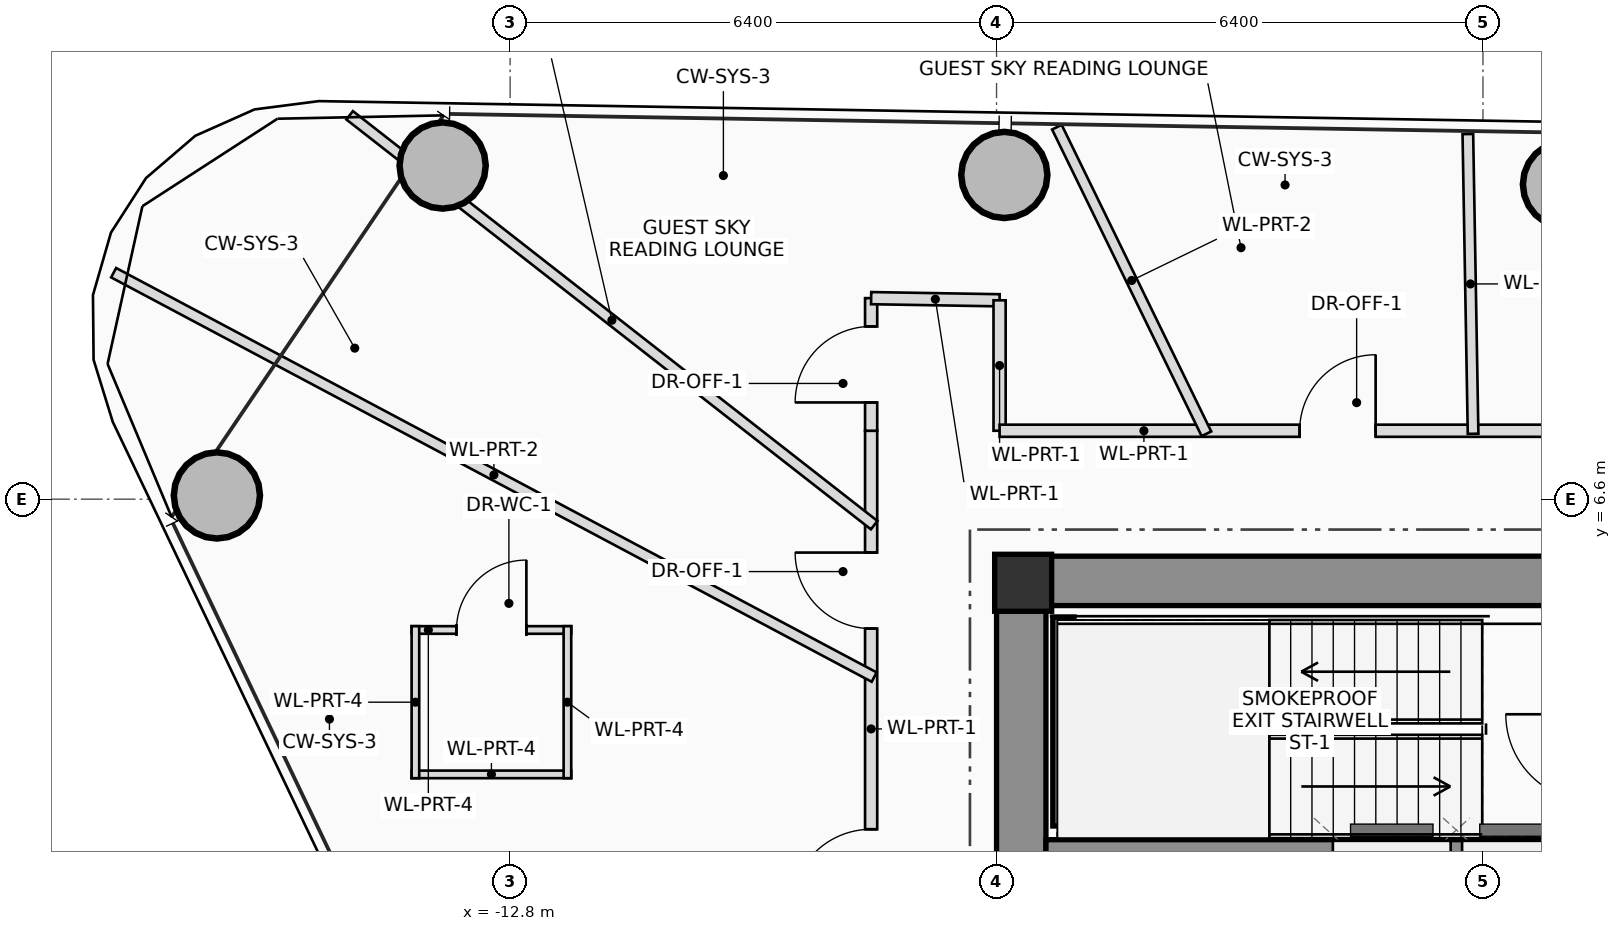
"""IFC4 building model, lengths in metres.
Left out: names, types, materials, properties, quantities, classifications, styles, units other than length and angle.
Written with IfcOpenShell. Run it as: python <this file> out.ifc"""

import sys

from ifc_helpers import new_model, si_unit, direction, frame, frame_2d, origin, origin_2d, place, context, subcontext, project, spatial, rectangle, hollow_circle, extrude, source, transform, mapped, element, fill, save


model = new_model("IFC4")
c1 = context("Model", 3, precision=1e-05, world=origin(), true_north=direction((0.0, 1.0)))
c2 = subcontext(c1, "Body", "Model", "MODEL_VIEW")
j1 = project(units=[si_unit("LENGTHUNIT", "METRE"), si_unit("PLANEANGLEUNIT", "RADIAN")], contexts=[c1])
p1 = place(None, origin())
s1 = spatial("IfcSite", under=j1, at=p1, CompositionType="ELEMENT")
p2 = place(p1, origin())
s2 = spatial("IfcBuilding", under=s1, at=p2, CompositionType="ELEMENT")
p3 = place(p2, frame((0.0, 0.0, 191.45)))
s3 = spatial("IfcBuildingStorey", under=s2, at=p3, CompositionType="ELEMENT", Elevation=191.45)
m1 = source(origin(), c2, "Body", "SweptSolid", [
    extrude(rectangle(XDim=0.75, YDim=0.75, at=origin_2d()), origin(), (0.0, 0.0, 1.0), 3.45),
])
p4 = place(p3, frame((-6.05, 5.5, 0.0), z_axis=(0.0, 0.0, 1.0), x_axis=(1.0, 0.0, 0.0)))
e1 = element("IfcColumn", 1, at=p4, inside=s3, PredefinedType="COLUMN", context=c2, shape_type="MappedRepresentation", body=[
    mapped(m1, transform((0.0, 0.0, 0.0), scale=1.0)),
])
p5 = place(p3, frame((-6.4, 5.525, 0.0), z_axis=(0.0, 0.0, 1.0), x_axis=(1.0, 0.0, 0.0)))
e2 = element("IfcWall", 2, at=p5, inside=s3, PredefinedType="SHEAR", context=c2, shape_type="SweptSolid", body=[
    extrude(rectangle(XDim=12.8, YDim=0.65, at=frame_2d((6.4, 0.0))), origin(), (0.0, 0.0, 1.0), 3.45),
])
p6 = place(p5, frame((8.6, 0.0, 0.0)))
e3 = element("IfcOpeningElement", 3, at=p6, cuts=e2, PredefinedType="OPENING", context=c2, shape_type="SweptSolid", body=[
    extrude(rectangle(XDim=1.2, YDim=2.2, at=frame_2d((0.6, 1.1))), frame((0.0, 0.335, 0.0), z_axis=(0.0, -1.0, 0.0), x_axis=(1.0, 0.0, 0.0)), (0.0, 0.0, 1.0), 0.67),
])
p7 = place(p3, frame((-6.075, 1.75, 0.0), z_axis=(0.0, 0.0, 1.0), x_axis=(0.0, 1.0, 0.0)))
e4 = element("IfcWall", 4, at=p7, inside=s3, PredefinedType="SHEAR", context=c2, shape_type="SweptSolid", body=[
    extrude(rectangle(XDim=3.45, YDim=0.65, at=frame_2d((1.725, 0.0))), origin(), (0.0, 0.0, 1.0), 3.45),
])
p8 = place(p3, frame((-5.75, 1.94, 0.0), z_axis=(0.0, 0.0, 1.0), x_axis=(1.0, 0.0, 0.0)))
e5 = element("IfcWall", 5, at=p8, inside=s3, PredefinedType="SHEAR", context=c2, shape_type="SweptSolid", body=[
    extrude(rectangle(XDim=11.5, YDim=0.36, at=frame_2d((5.75, 0.0))), origin(), (0.0, 0.0, 1.0), 3.45),
])
p9 = place(p3, frame((-5.52, 2.3, 0.0), z_axis=(0.0, 0.0, 1.0), x_axis=(0.0, 1.0, 0.0)))
e6 = element("IfcWall", 6, at=p9, inside=s3, PredefinedType="SHEAR", context=c2, shape_type="SweptSolid", body=[
    extrude(rectangle(XDim=2.75, YDim=0.28, at=frame_2d((1.375, 0.0))), origin(), (0.0, 0.0, 1.0), 3.45),
])
m2 = source(origin(), c2, "Body", "SweptSolid", [
    extrude(hollow_circle(Radius=0.575, WallThickness=0.042, at=origin_2d()), origin(), (0.0, 0.0, 1.0), 3.45),
])
for number, where, z_axis, x_axis in (
    (7, (1.092, 10.742, 0.0), (0.0, 0.0, 1.0), (1.0, 0.0, 0.0)),
    (8, (-6.298, 10.865, 0.0), (0.0, 0.0, 1.0), (1.0, 0.0, 0.0)),
    (9, (-13.688, 10.99, 0.0), (0.0, 0.0, 1.0), (1.0, 0.0, 0.0)),
    (10, (-16.658, 6.649, 0.0), (0.0, 0.0, 1.0), (1.0, 0.0, 0.0)),
):
    element("IfcColumn", number, at=place(p3, frame(where, z_axis=z_axis, x_axis=x_axis)), inside=s3, PredefinedType="COLUMN", context=c2, shape_type="MappedRepresentation", body=[
        mapped(m2, transform((0.0, 0.0, 0.0), scale=1.0)),
    ])
p10 = place(p3, frame((-14.096, 4.879, 0.0), z_axis=(0.0, 0.0, 1.0), x_axis=(1.0, 0.0, 0.0)))
e11 = element("IfcWall", 11, at=p10, inside=s3, PredefinedType="PARTITIONING", context=c2, shape_type="SweptSolid", body=[
    extrude(rectangle(XDim=2.1, YDim=0.1, at=frame_2d((1.05, 0.0))), origin(), (0.0, 0.0, 1.0), 2.905),
])
p11 = place(p10, frame((0.59, 0.0, 0.0)))
e12 = element("IfcOpeningElement", 12, at=p11, cuts=e11, PredefinedType="OPENING", context=c2, shape_type="SweptSolid", body=[
    extrude(rectangle(XDim=0.92, YDim=2.1, at=frame_2d((0.46, 1.05))), frame((0.0, 0.06, 0.0), z_axis=(0.0, -1.0, 0.0), x_axis=(1.0, 0.0, 0.0)), (0.0, 0.0, 1.0), 0.12),
])
p12 = place(p3, frame((-11.996, 2.979, 0.0), z_axis=(0.0, 0.0, 1.0), x_axis=(-1.0, 0.0, 0.0)))
e13 = element("IfcWall", 13, at=p12, inside=s3, PredefinedType="PARTITIONING", context=c2, shape_type="SweptSolid", body=[
    extrude(rectangle(XDim=2.1, YDim=0.1, at=frame_2d((1.05, 0.0))), origin(), (0.0, 0.0, 1.0), 2.905),
])
for number, where, z_axis, x_axis in (
    (14, (-12.046, 4.929, 0.0), (0.0, 0.0, 1.0), (0.0, -1.0, 0.0)),
    (15, (-14.046, 2.929, 0.0), (0.0, 0.0, 1.0), (0.0, 1.0, 0.0)),
):
    element("IfcWall", number, at=place(p3, frame(where, z_axis=z_axis, x_axis=x_axis)), inside=s3, PredefinedType="PARTITIONING", context=c2, shape_type="SweptSolid", body=[
        extrude(rectangle(XDim=2.0, YDim=0.1, at=frame_2d((1.0, 0.0))), origin(), (0.0, 0.0, 1.0), 3.25),
    ])
p13 = place(p3, frame((-8.05, -7.5, 0.0), z_axis=(0.0, 0.0, 1.0), x_axis=(0.0, 1.0, 0.0)))
e16 = element("IfcWall", 16, at=p13, inside=s3, PredefinedType="PARTITIONING", context=c2, shape_type="SweptSolid", body=[
    extrude(rectangle(XDim=15.0, YDim=0.16, at=frame_2d((7.5, 0.0))), origin(), (0.0, 0.0, 1.0), 2.605),
])
p14 = place(p13, frame((2.177, 0.0, 0.0)))
e17 = element("IfcOpeningElement", 17, at=p14, cuts=e16, PredefinedType="OPENING", context=c2, shape_type="SweptSolid", body=[
    extrude(rectangle(XDim=1.0, YDim=2.25, at=frame_2d((0.5, 1.125))), frame((0.0, 0.09, 0.0), z_axis=(0.0, -1.0, 0.0), x_axis=(1.0, 0.0, 0.0)), (0.0, 0.0, 1.0), 0.18),
])
p15 = place(p13, frame((5.453, 0.0, 0.0)))
e18 = element("IfcOpeningElement", 18, at=p15, cuts=e16, PredefinedType="OPENING", context=c2, shape_type="SweptSolid", body=[
    extrude(rectangle(XDim=0.9, YDim=2.05, at=frame_2d((0.45, 1.025))), frame((0.0, 0.09, 0.0), z_axis=(0.0, -1.0, 0.0), x_axis=(1.0, 0.0, 0.0)), (0.0, 0.0, 1.0), 0.18),
])
p16 = place(p13, frame((8.707, 0.0, 0.0)))
e19 = element("IfcOpeningElement", 19, at=p16, cuts=e16, PredefinedType="OPENING", context=c2, shape_type="SweptSolid", body=[
    extrude(rectangle(XDim=1.05, YDim=2.2, at=frame_2d((0.525, 1.1))), frame((0.0, 0.09, 0.0), z_axis=(0.0, -1.0, 0.0), x_axis=(1.0, 0.0, 0.0)), (0.0, 0.0, 1.0), 0.18),
])
p17 = place(p13, frame((12.397, 0.0, 0.0)))
e20 = element("IfcOpeningElement", 20, at=p17, cuts=e16, PredefinedType="OPENING", context=c2, shape_type="SweptSolid", body=[
    extrude(rectangle(XDim=1.0, YDim=2.25, at=frame_2d((0.5, 1.125))), frame((0.0, 0.09, 0.0), z_axis=(0.0, -1.0, 0.0), x_axis=(1.0, 0.0, 0.0)), (0.0, 0.0, 1.0), 0.18),
])
p18 = place(p3, frame((-8.05, 7.5, 0.0), z_axis=(0.0, 0.0, 1.0), x_axis=(0.0, 1.0, 0.0)))
e21 = element("IfcWall", 21, at=p18, inside=s3, PredefinedType="PARTITIONING", context=c2, shape_type="SweptSolid", body=[
    extrude(rectangle(XDim=1.745, YDim=0.16, at=frame_2d((0.872, 0.0))), origin(), (0.0, 0.0, 1.0), 2.805),
])
p19 = place(p18, frame((0.372, 0.0, 0.0)))
e22 = element("IfcOpeningElement", 22, at=p19, cuts=e21, PredefinedType="OPENING", context=c2, shape_type="SweptSolid", body=[
    extrude(rectangle(XDim=1.0, YDim=2.25, at=frame_2d((0.5, 1.125))), frame((0.0, 0.09, 0.0), z_axis=(0.0, -1.0, 0.0), x_axis=(1.0, 0.0, 0.0)), (0.0, 0.0, 1.0), 0.18),
])
p20 = place(p3, frame((-8.05, 9.245, 0.0), z_axis=(0.0, 0.0, 1.0), x_axis=(0.999859611566, -0.016755809729, 0.0)))
e23 = element("IfcWall", 23, at=p20, inside=s3, PredefinedType="PARTITIONING", context=c2, shape_type="SweptSolid", body=[
    extrude(rectangle(XDim=1.69, YDim=0.16, at=frame_2d((0.845, 0.0))), origin(), (0.0, 0.0, 1.0), 2.905),
])
p21 = place(p3, frame((-6.36, 9.216, 0.0), z_axis=(0.0, 0.0, 1.0), x_axis=(0.0, -1.0, 0.0)))
e24 = element("IfcWall", 24, at=p21, inside=s3, PredefinedType="PARTITIONING", context=c2, shape_type="SweptSolid", body=[
    extrude(rectangle(XDim=1.716, YDim=0.16, at=frame_2d((0.858, 0.0))), origin(), (0.0, 0.0, 1.0), 2.605),
])
p22 = place(p3, frame((-6.36, 7.5, 0.0), z_axis=(0.0, 0.0, 1.0), x_axis=(1.0, 0.0, 0.0)))
e25 = element("IfcWall", 25, at=p22, inside=s3, PredefinedType="PARTITIONING", context=c2, shape_type="SweptSolid", body=[
    extrude(rectangle(XDim=11.61, YDim=0.16, at=frame_2d((5.805, 0.0))), origin(), (0.0, 0.0, 1.0), 2.605),
])
p23 = place(p22, frame((3.948, 0.0, 0.0)))
e26 = element("IfcOpeningElement", 26, at=p23, cuts=e25, PredefinedType="OPENING", context=c2, shape_type="SweptSolid", body=[
    extrude(rectangle(XDim=1.0, YDim=2.25, at=frame_2d((0.5, 1.125))), frame((0.0, 0.09, 0.0), z_axis=(0.0, -1.0, 0.0), x_axis=(1.0, 0.0, 0.0)), (0.0, 0.0, 1.0), 0.18),
])
p24 = place(p22, frame((8.993, 0.0, 0.0)))
e27 = element("IfcOpeningElement", 27, at=p24, cuts=e25, PredefinedType="OPENING", context=c2, shape_type="SweptSolid", body=[
    extrude(rectangle(XDim=1.0, YDim=2.25, at=frame_2d((0.5, 1.125))), frame((0.0, 0.09, 0.0), z_axis=(0.0, -1.0, 0.0), x_axis=(1.0, 0.0, 0.0)), (0.0, 0.0, 1.0), 0.18),
])
p25 = place(p3, frame((-0.13, 7.46, 0.0), z_axis=(0.0, 0.0, 1.0), x_axis=(-0.017456477835, 0.999847624082, 0.0)))
e28 = element("IfcWall", 28, at=p25, inside=s3, PredefinedType="PARTITIONING", context=c2, shape_type="SweptSolid", body=[
    extrude(rectangle(XDim=3.944, YDim=0.14, at=frame_2d((1.972, 0.0))), origin(), (0.0, 0.0, 1.0), 2.765),
])
p26 = place(p3, frame((-3.638, 7.46, 0.0), z_axis=(0.0, 0.0, 1.0), x_axis=(-0.438379691007, 0.898789878956, 0.0)))
e29 = element("IfcWall", 29, at=p26, inside=s3, PredefinedType="PARTITIONING", context=c2, shape_type="SweptSolid", body=[
    extrude(rectangle(XDim=4.488, YDim=0.14, at=frame_2d((2.244, 0.0))), origin(), (0.0, 0.0, 1.0), 2.765),
])
p27 = place(p3, frame((-8.01, 6.258, 0.0), z_axis=(0.0, 0.0, 1.0), x_axis=(-0.788015921071, 0.615654861216, 0.0)))
e30 = element("IfcWall", 30, at=p27, inside=s3, PredefinedType="PARTITIONING", context=c2, shape_type="SweptSolid", body=[
    extrude(rectangle(XDim=8.758, YDim=0.14, at=frame_2d((4.379, 0.0))), origin(), (0.0, 0.0, 1.0), 2.805),
])
p28 = place(p3, frame((-8.01, 4.259, 0.0), z_axis=(0.0, 0.0, 1.0), x_axis=(-0.882949150857, 0.469468632606, 0.0)))
e31 = element("IfcWall", 31, at=p28, inside=s3, PredefinedType="PARTITIONING", context=c2, shape_type="SweptSolid", body=[
    extrude(rectangle(XDim=11.333, YDim=0.14, at=frame_2d((5.667, 0.0))), origin(), (0.0, 0.0, 1.0), 2.605),
])
p29 = place(p11, origin())
e32 = element("IfcDoor", 32, at=p29, inside=s3, OperationType="SINGLE_SWING_RIGHT", PredefinedType="DOOR", context=c2, shape_type="SweptSolid", body=[
    extrude(rectangle(XDim=0.92, YDim=2.1, at=frame_2d((0.46, 1.05))), frame((0.0, 0.025, 0.0), z_axis=(0.0, -1.0, 0.0), x_axis=(1.0, 0.0, 0.0)), (0.0, 0.0, 1.0), 0.05),
])
fill(e12, e32)
p30 = place(p16, origin())
e33 = element("IfcDoor", 33, at=p30, inside=s3, OperationType="SINGLE_SWING_LEFT", PredefinedType="DOOR", context=c2, shape_type="SweptSolid", body=[
    extrude(rectangle(XDim=1.05, YDim=2.2, at=frame_2d((0.525, 1.1))), frame((0.0, 0.025, 0.0), z_axis=(0.0, -1.0, 0.0), x_axis=(1.0, 0.0, 0.0)), (0.0, 0.0, 1.0), 0.05),
])
fill(e19, e33)
p31 = place(p17, origin())
e34 = element("IfcDoor", 34, at=p31, inside=s3, OperationType="SINGLE_SWING_RIGHT", PredefinedType="DOOR", context=c2, shape_type="SweptSolid", body=[
    extrude(rectangle(XDim=1.0, YDim=2.25, at=frame_2d((0.5, 1.125))), frame((0.0, 0.025, 0.0), z_axis=(0.0, -1.0, 0.0), x_axis=(1.0, 0.0, 0.0)), (0.0, 0.0, 1.0), 0.05),
])
fill(e20, e34)
p32 = place(p19, origin())
e35 = element("IfcDoor", 35, at=p32, inside=s3, OperationType="SINGLE_SWING_LEFT", PredefinedType="DOOR", context=c2, shape_type="SweptSolid", body=[
    extrude(rectangle(XDim=1.0, YDim=2.25, at=frame_2d((0.5, 1.125))), frame((0.0, 0.025, 0.0), z_axis=(0.0, -1.0, 0.0), x_axis=(1.0, 0.0, 0.0)), (0.0, 0.0, 1.0), 0.05),
])
fill(e22, e35)
p33 = place(p23, origin())
e36 = element("IfcDoor", 36, at=p33, inside=s3, OperationType="SINGLE_SWING_RIGHT", PredefinedType="DOOR", context=c2, shape_type="SweptSolid", body=[
    extrude(rectangle(XDim=1.0, YDim=2.25, at=frame_2d((0.5, 1.125))), frame((0.0, 0.025, 0.0), z_axis=(0.0, -1.0, 0.0), x_axis=(1.0, 0.0, 0.0)), (0.0, 0.0, 1.0), 0.05),
])
fill(e26, e36)
save(model, sys.argv[1])
